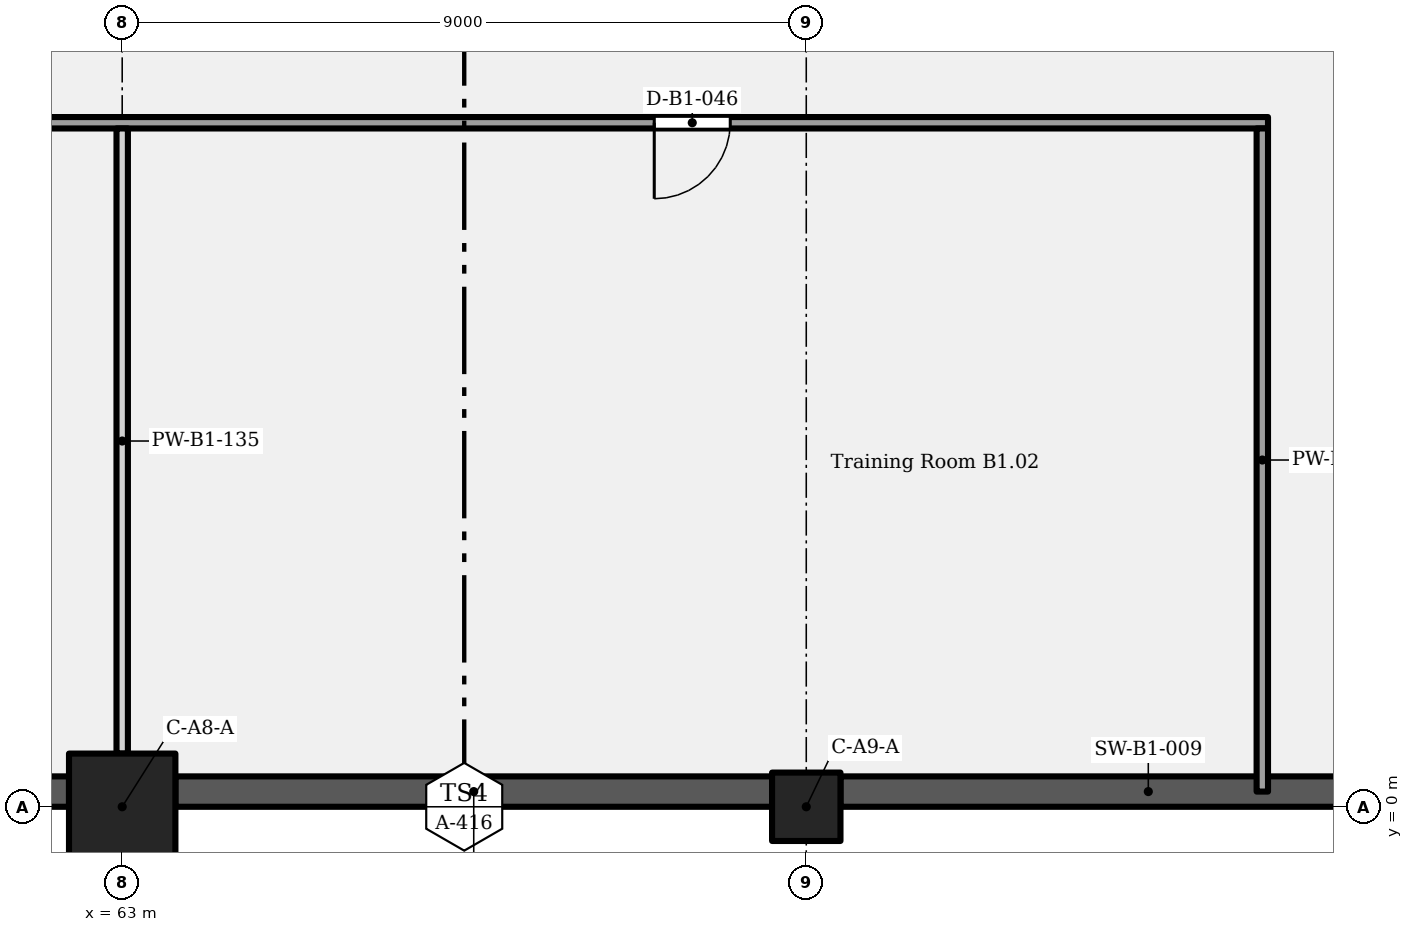
"""IFC4 building model, lengths in metres.
Left out: names, types, materials, properties, quantities, classifications, styles, units other than length and angle.
Written with IfcOpenShell. Run it as: python <this file> out.ifc"""

import sys

from ifc_helpers import new_model, si_unit, direction, frame, frame_2d, origin, origin_2d, place, context, subcontext, project, spatial, rectangle, extrude, element, fill, save


model = new_model("IFC4")
c1 = context("Model", 3, precision=1e-05, world=origin(), true_north=direction((0.0, 1.0)))
c2 = subcontext(c1, "Body", "Model", "MODEL_VIEW")
j1 = project(units=[si_unit("LENGTHUNIT", "METRE"), si_unit("PLANEANGLEUNIT", "RADIAN")], contexts=[c1])
p1 = place(None, origin())
s1 = spatial("IfcSite", under=j1, at=p1, CompositionType="ELEMENT")
p2 = place(p1, origin())
s2 = spatial("IfcBuilding", under=s1, at=p2, CompositionType="ELEMENT")
p3 = place(p2, frame((0.0, 0.0, -4.2)))
s3 = spatial("IfcBuildingStorey", under=s2, at=p3, CompositionType="ELEMENT", Elevation=-4.2)
p4 = place(p3, frame((63.0, 0.0, 0.0), z_axis=(0.0, 0.0, 1.0), x_axis=(1.0, 0.0, 0.0)))
e1 = element("IfcColumn", 1, at=p4, inside=s3, PredefinedType="COLUMN", context=c2, shape_type="SweptSolid", body=[
    extrude(rectangle(XDim=1.4, YDim=1.4, at=origin_2d()), origin(), (0.0, 0.0, 1.0), 4.2),
])
p5 = place(p3, frame((72.0, 0.0, 0.0), z_axis=(0.0, 0.0, 1.0), x_axis=(1.0, 0.0, 0.0)))
e2 = element("IfcColumn", 2, at=p5, inside=s3, PredefinedType="COLUMN", context=c2, shape_type="SweptSolid", body=[
    extrude(rectangle(XDim=0.9, YDim=0.9, at=origin_2d()), origin(), (0.0, 0.0, 1.0), 4.2),
])
p6 = place(p3, frame((54.7, 0.2, 0.0), z_axis=(0.0, 0.0, 1.0), x_axis=(1.0, 0.0, 0.0)))
e3 = element("IfcWall", 3, at=p6, inside=s3, PredefinedType="SOLIDWALL", context=c2, shape_type="SweptSolid", body=[
    extrude(rectangle(XDim=7.6, YDim=0.4, at=frame_2d((3.8, 0.0))), origin(), (0.0, 0.0, 1.0), 3.9),
])
p7 = place(p3, frame((63.7, 0.2, 0.0), z_axis=(0.0, 0.0, 1.0), x_axis=(1.0, 0.0, 0.0)))
e4 = element("IfcWall", 4, at=p7, inside=s3, PredefinedType="SOLIDWALL", context=c2, shape_type="SweptSolid", body=[
    extrude(rectangle(XDim=7.85, YDim=0.4, at=frame_2d((3.925, 0.0))), origin(), (0.0, 0.0, 1.0), 3.9),
])
p8 = place(p3, frame((72.45, 0.2, 0.0), z_axis=(0.0, 0.0, 1.0), x_axis=(1.0, 0.0, 0.0)))
e5 = element("IfcWall", 5, at=p8, inside=s3, PredefinedType="SOLIDWALL", context=c2, shape_type="SweptSolid", body=[
    extrude(rectangle(XDim=8.1, YDim=0.4, at=frame_2d((4.05, 0.0))), origin(), (0.0, 0.0, 1.0), 3.9),
])
p9 = place(p3, frame((11.925, 9.0, 0.0), z_axis=(0.0, 0.0, 1.0), x_axis=(1.0, 0.0, 0.0)))
e6 = element("IfcWall", 6, at=p9, inside=s3, PredefinedType="PARTITIONING", context=c2, shape_type="SweptSolid", body=[
    extrude(rectangle(XDim=66.15, YDim=0.15, at=frame_2d((33.075, 0.0))), origin(), (0.0, 0.0, 1.0), 3.9),
])
p10 = place(p9, frame((8.075, 0.0, 0.0), z_axis=(0.0, 0.0, 1.0), x_axis=(-1.0, 0.0, 0.0)))
e7 = element("IfcOpeningElement", 7, at=p10, cuts=e6, PredefinedType="OPENING", context=c2, shape_type="SweptSolid", body=[
    extrude(rectangle(XDim=1.0, YDim=2.1, at=frame_2d((0.5, 1.05))), frame((0.0, 0.085, 0.0), z_axis=(0.0, -1.0, 0.0), x_axis=(1.0, 0.0, 0.0)), (0.0, 0.0, 1.0), 0.17),
])
p11 = place(p9, frame((24.975, 0.0, 0.0), z_axis=(0.0, 0.0, 1.0), x_axis=(-1.0, 0.0, 0.0)))
e8 = element("IfcOpeningElement", 8, at=p11, cuts=e6, PredefinedType="OPENING", context=c2, shape_type="SweptSolid", body=[
    extrude(rectangle(XDim=1.8, YDim=2.1, at=frame_2d((0.9, 1.05))), frame((0.0, 0.085, 0.0), z_axis=(0.0, -1.0, 0.0), x_axis=(1.0, 0.0, 0.0)), (0.0, 0.0, 1.0), 0.17),
])
p12 = place(p9, frame((42.975, 0.0, 0.0), z_axis=(0.0, 0.0, 1.0), x_axis=(-1.0, 0.0, 0.0)))
e9 = element("IfcOpeningElement", 9, at=p12, cuts=e6, PredefinedType="OPENING", context=c2, shape_type="SweptSolid", body=[
    extrude(rectangle(XDim=1.8, YDim=2.1, at=frame_2d((0.9, 1.05))), frame((0.0, 0.085, 0.0), z_axis=(0.0, -1.0, 0.0), x_axis=(1.0, 0.0, 0.0)), (0.0, 0.0, 1.0), 0.17),
])
p13 = place(p9, frame((59.075, 0.0, 0.0), z_axis=(0.0, 0.0, 1.0), x_axis=(-1.0, 0.0, 0.0)))
e10 = element("IfcOpeningElement", 10, at=p13, cuts=e6, PredefinedType="OPENING", context=c2, shape_type="SweptSolid", body=[
    extrude(rectangle(XDim=1.0, YDim=2.1, at=frame_2d((0.5, 1.05))), frame((0.0, 0.085, 0.0), z_axis=(0.0, -1.0, 0.0), x_axis=(1.0, 0.0, 0.0)), (0.0, 0.0, 1.0), 0.17),
])
p14 = place(p3, frame((63.0, 0.7, 0.0), z_axis=(0.0, 0.0, 1.0), x_axis=(0.0, 1.0, 0.0)))
e11 = element("IfcWall", 11, at=p14, inside=s3, PredefinedType="PARTITIONING", context=c2, shape_type="SweptSolid", body=[
    extrude(rectangle(XDim=8.225, YDim=0.15, at=frame_2d((4.113, 0.0))), origin(), (0.0, 0.0, 1.0), 3.15),
])
p15 = place(p3, frame((78.0, 0.2, 0.0), z_axis=(0.0, 0.0, 1.0), x_axis=(0.0, 1.0, 0.0)))
e12 = element("IfcWall", 12, at=p15, inside=s3, PredefinedType="PARTITIONING", context=c2, shape_type="SweptSolid", body=[
    extrude(rectangle(XDim=8.725, YDim=0.15, at=frame_2d((4.363, 0.0))), origin(), (0.0, 0.0, 1.0), 3.9),
])
p16 = place(p13, origin())
e13 = element("IfcDoor", 13, at=p16, inside=s3, OperationType="SINGLE_SWING_RIGHT", PredefinedType="DOOR", context=c2, shape_type="SweptSolid", body=[
    extrude(rectangle(XDim=1.0, YDim=2.1, at=frame_2d((0.5, 1.05))), frame((0.0, 0.025, 0.0), z_axis=(0.0, -1.0, 0.0), x_axis=(1.0, 0.0, 0.0)), (0.0, 0.0, 1.0), 0.05),
])
fill(e10, e13)
save(model, sys.argv[1])
